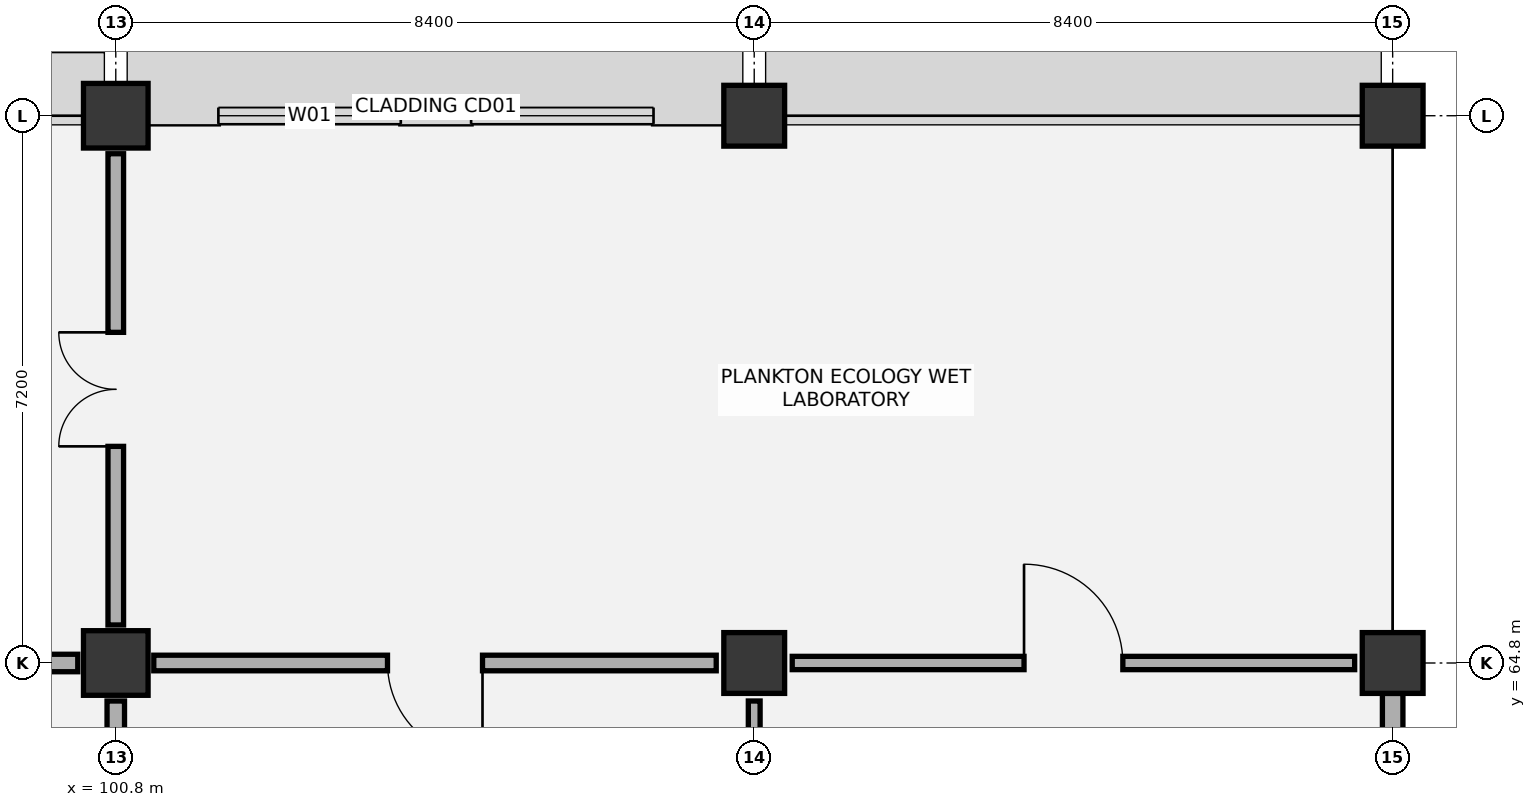
"""IFC4 building model, lengths in metres.
Left out: names, types, materials, properties, quantities, classifications, styles, units other than length and angle.
Written with IfcOpenShell. Run it as: python <this file> out.ifc"""

import sys

from ifc_helpers import new_model, si_unit, direction, frame, frame_2d, origin, origin_2d, place, context, subcontext, project, spatial, rectangle, extrude, element, fill, save


model = new_model("IFC4")
c1 = context("Model", 3, precision=1e-05, world=origin(), true_north=direction((0.0, 1.0)))
c2 = subcontext(c1, "Body", "Model", "MODEL_VIEW")
j1 = project(units=[si_unit("LENGTHUNIT", "METRE"), si_unit("PLANEANGLEUNIT", "RADIAN")], contexts=[c1])
p1 = place(None, origin())
s1 = spatial("IfcSite", under=j1, at=p1, CompositionType="ELEMENT")
p2 = place(p1, origin())
s2 = spatial("IfcBuilding", under=s1, at=p2, CompositionType="ELEMENT")
p3 = place(p2, frame((0.0, 0.0, 27.0)))
s3 = spatial("IfcBuildingStorey", under=s2, at=p3, CompositionType="ELEMENT", Elevation=27.0)
for number, where, z_axis, x_axis in (
    (1, (100.8, 64.8, 0.0), (0.0, 0.0, 1.0), (1.0, 0.0, 0.0)),
    (2, (100.8, 72.0, 0.0), (0.0, 0.0, 1.0), (1.0, 0.0, 0.0)),
):
    element("IfcColumn", number, at=place(p3, frame(where, z_axis=z_axis, x_axis=x_axis)), inside=s3, PredefinedType="COLUMN", context=c2, shape_type="SweptSolid", body=[
        extrude(rectangle(XDim=0.85, YDim=0.85, at=origin_2d()), origin(), (0.0, 0.0, 1.0), 4.2),
    ])
for number, where, z_axis, x_axis in (
    (3, (109.2, 64.8, 0.0), (0.0, 0.0, 1.0), (1.0, 0.0, 0.0)),
    (4, (109.2, 72.0, 0.0), (0.0, 0.0, 1.0), (1.0, 0.0, 0.0)),
    (5, (117.6, 64.8, 0.0), (0.0, 0.0, 1.0), (1.0, 0.0, 0.0)),
    (6, (117.6, 72.0, 0.0), (0.0, 0.0, 1.0), (1.0, 0.0, 0.0)),
):
    element("IfcColumn", number, at=place(p3, frame(where, z_axis=z_axis, x_axis=x_axis)), inside=s3, PredefinedType="COLUMN", context=c2, shape_type="SweptSolid", body=[
        extrude(rectangle(XDim=0.8, YDim=0.8, at=origin_2d()), origin(), (0.0, 0.0, 1.0), 4.2),
    ])
p4 = place(p3, frame((101.225, 72.0, 0.0), z_axis=(0.0, 0.0, 1.0), x_axis=(1.0, 0.0, 0.0)))
e7 = element("IfcWall", 7, at=p4, inside=s3, PredefinedType="SOLIDWALL", context=c2, shape_type="SweptSolid", body=[
    extrude(rectangle(XDim=7.575, YDim=0.215, at=frame_2d((3.788, 0.0))), origin(), (0.0, 0.0, 1.0), 3.365),
])
p5 = place(p4, frame((0.925, 0.0, 0.9)))
e8 = element("IfcOpeningElement", 8, at=p5, cuts=e7, PredefinedType="OPENING", context=c2, shape_type="SweptSolid", body=[
    extrude(rectangle(XDim=2.4, YDim=1.8, at=frame_2d((1.2, 0.9))), frame((0.0, 0.117, 0.0), z_axis=(0.0, -1.0, 0.0), x_axis=(1.0, 0.0, 0.0)), (0.0, 0.0, 1.0), 0.235),
])
p6 = place(p4, frame((4.25, 0.0, 0.9)))
e9 = element("IfcOpeningElement", 9, at=p6, cuts=e7, PredefinedType="OPENING", context=c2, shape_type="SweptSolid", body=[
    extrude(rectangle(XDim=2.4, YDim=1.8, at=frame_2d((1.2, 0.9))), frame((0.0, 0.117, 0.0), z_axis=(0.0, -1.0, 0.0), x_axis=(1.0, 0.0, 0.0)), (0.0, 0.0, 1.0), 0.235),
])
p7 = place(p3, frame((117.6, 58.0, 0.0), z_axis=(0.0, 0.0, 1.0), x_axis=(0.0, 1.0, 0.0)))
e10 = element("IfcWall", 10, at=p7, inside=s3, PredefinedType="SOLIDWALL", context=c2, shape_type="SweptSolid", body=[
    extrude(rectangle(XDim=6.4, YDim=0.27, at=frame_2d((3.2, 0.0))), origin(), (0.0, 0.0, 1.0), 3.365),
])
p8 = place(p7, frame((2.075, 0.0, 0.9)))
e11 = element("IfcOpeningElement", 11, at=p8, cuts=e10, PredefinedType="OPENING", context=c2, shape_type="SweptSolid", body=[
    extrude(rectangle(XDim=2.25, YDim=1.95, at=frame_2d((1.125, 0.975))), frame((0.0, 0.145, 0.0), z_axis=(0.0, -1.0, 0.0), x_axis=(1.0, 0.0, 0.0)), (0.0, 0.0, 1.0), 0.29),
])
p9 = place(p3, frame((100.8, 58.1, 0.0), z_axis=(0.0, 0.0, 1.0), x_axis=(0.0, 1.0, 0.0)))
e12 = element("IfcWall", 12, at=p9, inside=s3, PredefinedType="PARTITIONING", context=c2, shape_type="SweptSolid", body=[
    extrude(rectangle(XDim=6.2, YDim=0.23, at=frame_2d((3.1, 0.0))), origin(), (0.0, 0.0, 1.0), 3.265),
])
p10 = place(p3, frame((92.9, 64.8, 0.0), z_axis=(0.0, 0.0, 1.0), x_axis=(1.0, 0.0, 0.0)))
e13 = element("IfcWall", 13, at=p10, inside=s3, PredefinedType="PARTITIONING", context=c2, shape_type="SweptSolid", body=[
    extrude(rectangle(XDim=7.4, YDim=0.23, at=frame_2d((3.7, 0.0))), origin(), (0.0, 0.0, 1.0), 3.565),
])
p11 = place(p3, frame((100.8, 65.3, 0.0), z_axis=(0.0, 0.0, 1.0), x_axis=(0.0, 1.0, 0.0)))
e14 = element("IfcWall", 14, at=p11, inside=s3, PredefinedType="PARTITIONING", context=c2, shape_type="SweptSolid", body=[
    extrude(rectangle(XDim=6.2, YDim=0.205, at=frame_2d((3.1, 0.0))), origin(), (0.0, 0.0, 1.0), 3.625),
])
p12 = place(p11, frame((2.35, 0.0, 0.0)))
e15 = element("IfcOpeningElement", 15, at=p12, cuts=e14, PredefinedType="OPENING", context=c2, shape_type="SweptSolid", body=[
    extrude(rectangle(XDim=1.5, YDim=2.2, at=frame_2d((0.75, 1.1))), frame((0.0, 0.113, 0.0), z_axis=(0.0, -1.0, 0.0), x_axis=(1.0, 0.0, 0.0)), (0.0, 0.0, 1.0), 0.225),
])
p13 = place(p3, frame((109.2, 58.1, 0.0), z_axis=(0.0, 0.0, 1.0), x_axis=(0.0, 1.0, 0.0)))
e16 = element("IfcWall", 16, at=p13, inside=s3, PredefinedType="PARTITIONING", context=c2, shape_type="SweptSolid", body=[
    extrude(rectangle(XDim=6.2, YDim=0.155, at=frame_2d((3.1, 0.0))), origin(), (0.0, 0.0, 1.0), 3.625),
])
p14 = place(p13, frame((2.525, 0.0, 0.0)))
e17 = element("IfcOpeningElement", 17, at=p14, cuts=e16, PredefinedType="OPENING", context=c2, shape_type="SweptSolid", body=[
    extrude(rectangle(XDim=1.15, YDim=2.1, at=frame_2d((0.575, 1.05))), frame((0.0, 0.087, 0.0), z_axis=(0.0, -1.0, 0.0), x_axis=(1.0, 0.0, 0.0)), (0.0, 0.0, 1.0), 0.175),
])
p15 = place(p3, frame((101.3, 64.8, 0.0), z_axis=(0.0, 0.0, 1.0), x_axis=(1.0, 0.0, 0.0)))
e18 = element("IfcWall", 18, at=p15, inside=s3, PredefinedType="PARTITIONING", context=c2, shape_type="SweptSolid", body=[
    extrude(rectangle(XDim=7.4, YDim=0.205, at=frame_2d((3.7, 0.0))), origin(), (0.0, 0.0, 1.0), 3.625),
])
p16 = place(p15, frame((3.075, 0.0, 0.0)))
e19 = element("IfcOpeningElement", 19, at=p16, cuts=e18, PredefinedType="OPENING", context=c2, shape_type="SweptSolid", body=[
    extrude(rectangle(XDim=1.25, YDim=2.1, at=frame_2d((0.625, 1.05))), frame((0.0, 0.113, 0.0), z_axis=(0.0, -1.0, 0.0), x_axis=(1.0, 0.0, 0.0)), (0.0, 0.0, 1.0), 0.225),
])
p17 = place(p3, frame((109.7, 64.8, 0.0), z_axis=(0.0, 0.0, 1.0), x_axis=(1.0, 0.0, 0.0)))
e20 = element("IfcWall", 20, at=p17, inside=s3, PredefinedType="PARTITIONING", context=c2, shape_type="SweptSolid", body=[
    extrude(rectangle(XDim=7.4, YDim=0.175, at=frame_2d((3.7, 0.0))), origin(), (0.0, 0.0, 1.0), 3.215),
])
p18 = place(p17, frame((3.05, 0.0, 0.0)))
e21 = element("IfcOpeningElement", 21, at=p18, cuts=e20, PredefinedType="OPENING", context=c2, shape_type="SweptSolid", body=[
    extrude(rectangle(XDim=1.3, YDim=2.15, at=frame_2d((0.65, 1.075))), frame((0.0, 0.097, 0.0), z_axis=(0.0, -1.0, 0.0), x_axis=(1.0, 0.0, 0.0)), (0.0, 0.0, 1.0), 0.195),
])
p19 = place(p5, origin())
e22 = element("IfcWindow", 22, at=p19, inside=s3, PartitioningType="SINGLE_PANEL", PredefinedType="WINDOW", context=c2, shape_type="SweptSolid", body=[
    extrude(rectangle(XDim=2.4, YDim=1.8, at=frame_2d((1.2, 0.9))), frame((0.0, 0.03, 0.0), z_axis=(0.0, -1.0, 0.0), x_axis=(1.0, 0.0, 0.0)), (0.0, 0.0, 1.0), 0.06),
])
fill(e8, e22)
p20 = place(p6, origin())
e23 = element("IfcWindow", 23, at=p20, inside=s3, PartitioningType="SINGLE_PANEL", PredefinedType="WINDOW", context=c2, shape_type="SweptSolid", body=[
    extrude(rectangle(XDim=2.4, YDim=1.8, at=frame_2d((1.2, 0.9))), frame((0.0, 0.03, 0.0), z_axis=(0.0, -1.0, 0.0), x_axis=(1.0, 0.0, 0.0)), (0.0, 0.0, 1.0), 0.06),
])
fill(e9, e23)
p21 = place(p12, origin())
e24 = element("IfcDoor", 24, at=p21, inside=s3, OperationType="DOUBLE_DOOR_SINGLE_SWING", PredefinedType="DOOR", context=c2, shape_type="SweptSolid", body=[
    extrude(rectangle(XDim=1.5, YDim=2.2, at=frame_2d((0.75, 1.1))), frame((0.0, 0.025, 0.0), z_axis=(0.0, -1.0, 0.0), x_axis=(1.0, 0.0, 0.0)), (0.0, 0.0, 1.0), 0.05),
])
fill(e15, e24)
p22 = place(p16, frame((1.25, 0.0, 0.0), z_axis=(0.0, 0.0, 1.0), x_axis=(-1.0, 0.0, 0.0)))
e25 = element("IfcDoor", 25, at=p22, inside=s3, OperationType="SINGLE_SWING_LEFT", PredefinedType="DOOR", context=c2, shape_type="SweptSolid", body=[
    extrude(rectangle(XDim=1.25, YDim=2.1, at=frame_2d((0.625, 1.05))), frame((0.0, 0.025, 0.0), z_axis=(0.0, -1.0, 0.0), x_axis=(1.0, 0.0, 0.0)), (0.0, 0.0, 1.0), 0.05),
])
fill(e19, e25)
p23 = place(p18, origin())
e26 = element("IfcDoor", 26, at=p23, inside=s3, OperationType="SINGLE_SWING_LEFT", PredefinedType="DOOR", context=c2, shape_type="SweptSolid", body=[
    extrude(rectangle(XDim=1.3, YDim=2.15, at=frame_2d((0.65, 1.075))), frame((0.0, 0.025, 0.0), z_axis=(0.0, -1.0, 0.0), x_axis=(1.0, 0.0, 0.0)), (0.0, 0.0, 1.0), 0.05),
])
fill(e21, e26)
save(model, sys.argv[1])
